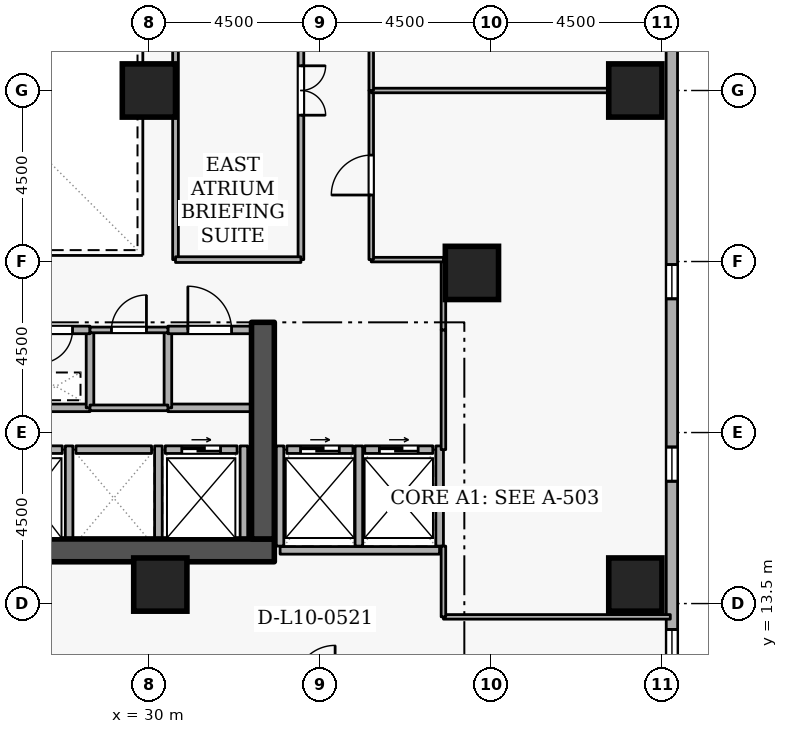
"""IFC4 building model, lengths in metres.
Left out: names, types, materials, properties, quantities, classifications, styles, units other than length and angle.
Written with IfcOpenShell. Run it as: python <this file> out.ifc"""

import sys

from ifc_helpers import new_model, si_unit, direction, frame, frame_2d, origin, origin_2d, place, context, subcontext, project, spatial, rectangle, extrude, element, fill, save


model = new_model("IFC4")
c1 = context("Model", 3, precision=1e-05, world=origin(), true_north=direction((0.0, 1.0)))
c2 = subcontext(c1, "Body", "Model", "MODEL_VIEW")
j1 = project(units=[si_unit("LENGTHUNIT", "METRE"), si_unit("PLANEANGLEUNIT", "RADIAN")], contexts=[c1])
p1 = place(None, origin())
s1 = spatial("IfcSite", under=j1, at=p1, CompositionType="ELEMENT")
p2 = place(p1, origin())
s2 = spatial("IfcBuilding", under=s1, at=p2, CompositionType="ELEMENT")
p3 = place(p2, frame((0.0, 0.0, 42.3)))
s3 = spatial("IfcBuildingStorey", under=s2, at=p3, CompositionType="ELEMENT", Elevation=42.3)
p4 = place(p3, frame((17.7, 14.9, 0.0), z_axis=(0.0, 0.0, 1.0), x_axis=(1.0, 0.0, 0.0)))
e1 = element("IfcWall", 1, at=p4, inside=s3, PredefinedType="SHEAR", context=c2, shape_type="SweptSolid", body=[
    extrude(rectangle(XDim=15.6, YDim=0.6, at=frame_2d((7.8, 0.0))), origin(), (0.0, 0.0, 1.0), 3.6),
])
p5 = place(p3, frame((33.0, 15.2, 0.0), z_axis=(0.0, 0.0, 1.0), x_axis=(0.0, 1.0, 0.0)))
e2 = element("IfcWall", 2, at=p5, inside=s3, PredefinedType="SHEAR", context=c2, shape_type="SweptSolid", body=[
    extrude(rectangle(XDim=5.7, YDim=0.6, at=frame_2d((2.85, 0.0))), origin(), (0.0, 0.0, 1.0), 3.6),
])
for number, where, z_axis, x_axis in (
    (3, (42.8, 14.0, 0.0), (0.0, 0.0, 1.0), (1.0, 0.0, 0.0)),
    (4, (42.8, 27.0, 0.0), (0.0, 0.0, 1.0), (1.0, 0.0, 0.0)),
    (5, (38.5, 22.2, 0.0), (0.0, 0.0, 1.0), (1.0, 0.0, 0.0)),
    (6, (30.3, 14.0, 0.0), (0.0, 0.0, 1.0), (1.0, 0.0, 0.0)),
    (7, (30.0, 27.0, 0.0), (0.0, 0.0, 1.0), (1.0, 0.0, 0.0)),
):
    element("IfcColumn", number, at=place(p3, frame(where, z_axis=z_axis, x_axis=x_axis)), inside=s3, PredefinedType="COLUMN", context=c2, shape_type="SweptSolid", body=[
        extrude(rectangle(XDim=1.4, YDim=1.4, at=origin_2d()), origin(), (0.0, 0.0, 1.0), 3.6),
    ])
p6 = place(p3, frame((43.765, 5.319, 0.0), z_axis=(0.0, 0.0, 1.0), x_axis=(-0.000208784245, 0.999999978205, 0.0)))
e8 = element("IfcWall", 8, at=p6, inside=s3, PredefinedType="STANDARD", context=c2, shape_type="SweptSolid", body=[
    extrude(rectangle(XDim=35.08, YDim=0.3, at=frame_2d((17.54, 0.0))), origin(), (0.0, 0.0, 1.0), 2.7),
])
p7 = place(p6, frame((1.8, 0.0, 0.72)))
e9 = element("IfcOpeningElement", 9, at=p7, cuts=e8, PredefinedType="OPENING", context=c2, shape_type="SweptSolid", body=[
    extrude(rectangle(XDim=0.9, YDim=1.75, at=frame_2d((0.45, 0.875))), frame((0.0, 0.16, 0.0), z_axis=(0.0, -1.0, 0.0), x_axis=(1.0, 0.0, 0.0)), (0.0, 0.0, 1.0), 0.32),
])
p8 = place(p6, frame((6.6, 0.0, 0.72)))
e10 = element("IfcOpeningElement", 10, at=p8, cuts=e8, PredefinedType="OPENING", context=c2, shape_type="SweptSolid", body=[
    extrude(rectangle(XDim=0.9, YDim=1.75, at=frame_2d((0.45, 0.875))), frame((0.0, 0.16, 0.0), z_axis=(0.0, -1.0, 0.0), x_axis=(1.0, 0.0, 0.0)), (0.0, 0.0, 1.0), 0.32),
])
p9 = place(p6, frame((11.4, 0.0, 0.72)))
e11 = element("IfcOpeningElement", 11, at=p9, cuts=e8, PredefinedType="OPENING", context=c2, shape_type="SweptSolid", body=[
    extrude(rectangle(XDim=0.9, YDim=1.75, at=frame_2d((0.45, 0.875))), frame((0.0, 0.16, 0.0), z_axis=(0.0, -1.0, 0.0), x_axis=(1.0, 0.0, 0.0)), (0.0, 0.0, 1.0), 0.32),
])
p10 = place(p6, frame((16.2, 0.0, 0.72)))
e12 = element("IfcOpeningElement", 12, at=p10, cuts=e8, PredefinedType="OPENING", context=c2, shape_type="SweptSolid", body=[
    extrude(rectangle(XDim=0.9, YDim=1.75, at=frame_2d((0.45, 0.875))), frame((0.0, 0.16, 0.0), z_axis=(0.0, -1.0, 0.0), x_axis=(1.0, 0.0, 0.0)), (0.0, 0.0, 1.0), 0.32),
])
p11 = place(p6, frame((25.8, 0.0, 0.72)))
e13 = element("IfcOpeningElement", 13, at=p11, cuts=e8, PredefinedType="OPENING", context=c2, shape_type="SweptSolid", body=[
    extrude(rectangle(XDim=0.9, YDim=1.75, at=frame_2d((0.45, 0.875))), frame((0.0, 0.16, 0.0), z_axis=(0.0, -1.0, 0.0), x_axis=(1.0, 0.0, 0.0)), (0.0, 0.0, 1.0), 0.32),
])
p12 = place(p6, frame((30.6, 0.0, 0.72)))
e14 = element("IfcOpeningElement", 14, at=p12, cuts=e8, PredefinedType="OPENING", context=c2, shape_type="SweptSolid", body=[
    extrude(rectangle(XDim=0.9, YDim=1.75, at=frame_2d((0.45, 0.875))), frame((0.0, 0.16, 0.0), z_axis=(0.0, -1.0, 0.0), x_axis=(1.0, 0.0, 0.0)), (0.0, 0.0, 1.0), 0.32),
])
p13 = place(p3, frame((26.08, 17.55, 0.0), z_axis=(0.0, 0.0, 1.0), x_axis=(1.0, 0.0, 0.0)))
e15 = element("IfcWall", 15, at=p13, inside=s3, PredefinedType="STANDARD", context=c2, shape_type="SweptSolid", body=[
    extrude(rectangle(XDim=1.64, YDim=0.2, at=frame_2d((0.82, 0.0))), origin(), (0.0, 0.0, 1.0), 3.34),
])
p14 = place(p13, frame((0.31, 0.0, 0.0)))
e16 = element("IfcOpeningElement", 16, at=p14, cuts=e15, PredefinedType="OPENING", context=c2, shape_type="SweptSolid", body=[
    extrude(rectangle(XDim=1.02, YDim=2.06, at=frame_2d((0.51, 1.03))), frame((0.0, 0.11, 0.0), z_axis=(0.0, -1.0, 0.0), x_axis=(1.0, 0.0, 0.0)), (0.0, 0.0, 1.0), 0.22),
])
p15 = place(p3, frame((28.08, 17.55, 0.0), z_axis=(0.0, 0.0, 1.0), x_axis=(1.0, 0.0, 0.0)))
e17 = element("IfcWall", 17, at=p15, inside=s3, PredefinedType="STANDARD", context=c2, shape_type="SweptSolid", body=[
    extrude(rectangle(XDim=1.99, YDim=0.2, at=frame_2d((0.995, 0.0))), origin(), (0.0, 0.0, 1.0), 3.34),
])
p16 = place(p3, frame((30.43, 17.55, 0.0), z_axis=(0.0, 0.0, 1.0), x_axis=(1.0, 0.0, 0.0)))
e18 = element("IfcWall", 18, at=p16, inside=s3, PredefinedType="STANDARD", context=c2, shape_type="SweptSolid", body=[
    extrude(rectangle(XDim=1.89, YDim=0.2, at=frame_2d((0.945, 0.0))), origin(), (0.0, 0.0, 1.0), 3.34),
])
p17 = place(p16, frame((0.435, 0.0, 0.0)))
e19 = element("IfcOpeningElement", 19, at=p17, cuts=e18, PredefinedType="OPENING", context=c2, shape_type="SweptSolid", body=[
    extrude(rectangle(XDim=1.02, YDim=2.06, at=frame_2d((0.51, 1.03))), frame((0.0, 0.11, 0.0), z_axis=(0.0, -1.0, 0.0), x_axis=(1.0, 0.0, 0.0)), (0.0, 0.0, 1.0), 0.22),
])
p18 = place(p3, frame((33.63, 17.55, 0.0), z_axis=(0.0, 0.0, 1.0), x_axis=(1.0, 0.0, 0.0)))
e20 = element("IfcWall", 20, at=p18, inside=s3, PredefinedType="STANDARD", context=c2, shape_type="SweptSolid", body=[
    extrude(rectangle(XDim=1.74, YDim=0.2, at=frame_2d((0.87, 0.0))), origin(), (0.0, 0.0, 1.0), 3.34),
])
p19 = place(p18, frame((0.36, 0.0, 0.0)))
e21 = element("IfcOpeningElement", 21, at=p19, cuts=e20, PredefinedType="OPENING", context=c2, shape_type="SweptSolid", body=[
    extrude(rectangle(XDim=1.02, YDim=2.06, at=frame_2d((0.51, 1.03))), frame((0.0, 0.11, 0.0), z_axis=(0.0, -1.0, 0.0), x_axis=(1.0, 0.0, 0.0)), (0.0, 0.0, 1.0), 0.22),
])
p20 = place(p3, frame((35.68, 17.55, 0.0), z_axis=(0.0, 0.0, 1.0), x_axis=(1.0, 0.0, 0.0)))
e22 = element("IfcWall", 22, at=p20, inside=s3, PredefinedType="STANDARD", context=c2, shape_type="SweptSolid", body=[
    extrude(rectangle(XDim=1.79, YDim=0.2, at=frame_2d((0.895, 0.0))), origin(), (0.0, 0.0, 1.0), 3.34),
])
p21 = place(p20, frame((0.385, 0.0, 0.0)))
e23 = element("IfcOpeningElement", 23, at=p21, cuts=e22, PredefinedType="OPENING", context=c2, shape_type="SweptSolid", body=[
    extrude(rectangle(XDim=1.02, YDim=2.06, at=frame_2d((0.51, 1.03))), frame((0.0, 0.11, 0.0), z_axis=(0.0, -1.0, 0.0), x_axis=(1.0, 0.0, 0.0)), (0.0, 0.0, 1.0), 0.22),
])
for number, where, z_axis, x_axis in (
    (24, (27.9, 15.212, 0.0), (0.0, 0.0, 1.0), (0.0, 1.0, 0.0)),
    (25, (30.25, 15.212, 0.0), (0.0, 0.0, 1.0), (0.0, 1.0, 0.0)),
    (26, (32.5, 15.212, 0.0), (0.0, 0.0, 1.0), (0.0, 1.0, 0.0)),
):
    element("IfcWall", number, at=place(p3, frame(where, z_axis=z_axis, x_axis=x_axis)), inside=s3, PredefinedType="STANDARD", context=c2, shape_type="SweptSolid", body=[
        extrude(rectangle(XDim=2.436, YDim=0.2, at=frame_2d((1.218, 0.0))), origin(), (0.0, 0.0, 1.0), 3.34),
    ])
p22 = place(p3, frame((33.452, 14.9, 0.0), z_axis=(0.0, 0.0, 1.0), x_axis=(1.0, 0.0, 0.0)))
e27 = element("IfcWall", 27, at=p22, inside=s3, PredefinedType="STANDARD", context=c2, shape_type="SweptSolid", body=[
    extrude(rectangle(XDim=4.196, YDim=0.2, at=frame_2d((2.098, 0.0))), origin(), (0.0, 0.0, 1.0), 3.34),
])
for number, where, z_axis, x_axis in (
    (28, (35.525, 15.012, 0.0), (0.0, 0.0, 1.0), (0.0, 1.0, 0.0)),
    (29, (33.45, 15.012, 0.0), (0.0, 0.0, 1.0), (0.0, 1.0, 0.0)),
    (30, (37.65, 15.012, 0.0), (0.0, 0.0, 1.0), (0.0, 1.0, 0.0)),
):
    element("IfcWall", number, at=place(p3, frame(where, z_axis=z_axis, x_axis=x_axis)), inside=s3, PredefinedType="STANDARD", context=c2, shape_type="SweptSolid", body=[
        extrude(rectangle(XDim=2.636, YDim=0.2, at=frame_2d((1.318, 0.0))), origin(), (0.0, 0.0, 1.0), 3.34),
    ])
p23 = place(p3, frame((26.65, 18.65, 0.0), z_axis=(0.0, 0.0, 1.0), x_axis=(1.0, 0.0, 0.0)))
e31 = element("IfcWall", 31, at=p23, inside=s3, PredefinedType="STANDARD", context=c2, shape_type="SweptSolid", body=[
    extrude(rectangle(XDim=1.8, YDim=0.2, at=frame_2d((0.9, 0.0))), origin(), (0.0, 0.0, 1.0), 3.34),
])
p24 = place(p3, frame((28.45, 18.65, 0.0), z_axis=(0.0, 0.0, 1.0), x_axis=(0.0, 1.0, 0.0)))
e32 = element("IfcWall", 32, at=p24, inside=s3, PredefinedType="STANDARD", context=c2, shape_type="SweptSolid", body=[
    extrude(rectangle(XDim=2.05, YDim=0.2, at=frame_2d((1.025, 0.0))), origin(), (0.0, 0.0, 1.0), 3.34),
])
p25 = place(p3, frame((28.45, 20.7, 0.0), z_axis=(0.0, 0.0, 1.0), x_axis=(-1.0, 0.0, 0.0)))
e33 = element("IfcWall", 33, at=p25, inside=s3, PredefinedType="STANDARD", context=c2, shape_type="SweptSolid", body=[
    extrude(rectangle(XDim=1.8, YDim=0.2, at=frame_2d((0.9, 0.0))), origin(), (0.0, 0.0, 1.0), 3.34),
])
p26 = place(p25, frame((0.46, 0.0, 0.0)))
e34 = element("IfcOpeningElement", 34, at=p26, cuts=e33, PredefinedType="OPENING", context=c2, shape_type="SweptSolid", body=[
    extrude(rectangle(XDim=0.88, YDim=2.04, at=frame_2d((0.44, 1.02))), frame((0.0, 0.11, 0.0), z_axis=(0.0, -1.0, 0.0), x_axis=(1.0, 0.0, 0.0)), (0.0, 0.0, 1.0), 0.22),
])
p27 = place(p3, frame((32.7, 18.65, 0.0), z_axis=(0.0, 0.0, 1.0), x_axis=(-1.0, 0.0, 0.0)))
e35 = element("IfcWall", 35, at=p27, inside=s3, PredefinedType="STANDARD", context=c2, shape_type="SweptSolid", body=[
    extrude(rectangle(XDim=2.2, YDim=0.2, at=frame_2d((1.1, 0.0))), origin(), (0.0, 0.0, 1.0), 3.34),
])
p28 = place(p3, frame((30.5, 18.65, 0.0), z_axis=(0.0, 0.0, 1.0), x_axis=(0.0, 1.0, 0.0)))
e36 = element("IfcWall", 36, at=p28, inside=s3, PredefinedType="STANDARD", context=c2, shape_type="SweptSolid", body=[
    extrude(rectangle(XDim=2.05, YDim=0.2, at=frame_2d((1.025, 0.0))), origin(), (0.0, 0.0, 1.0), 3.34),
])
p29 = place(p3, frame((30.5, 20.7, 0.0), z_axis=(0.0, 0.0, 1.0), x_axis=(1.0, 0.0, 0.0)))
e37 = element("IfcWall", 37, at=p29, inside=s3, PredefinedType="STANDARD", context=c2, shape_type="SweptSolid", body=[
    extrude(rectangle(XDim=2.2, YDim=0.2, at=frame_2d((1.1, 0.0))), origin(), (0.0, 0.0, 1.0), 3.34),
])
p30 = place(p29, frame((0.525, 0.0, 0.0)))
e38 = element("IfcOpeningElement", 38, at=p30, cuts=e37, PredefinedType="OPENING", context=c2, shape_type="SweptSolid", body=[
    extrude(rectangle(XDim=1.15, YDim=2.1, at=frame_2d((0.575, 1.05))), frame((0.0, 0.11, 0.0), z_axis=(0.0, -1.0, 0.0), x_axis=(1.0, 0.0, 0.0)), (0.0, 0.0, 1.0), 0.22),
])
p31 = place(p3, frame((30.5, 18.65, 0.0), z_axis=(0.0, 0.0, 1.0), x_axis=(-1.0, 0.0, 0.0)))
e39 = element("IfcWall", 39, at=p31, inside=s3, PredefinedType="PARTITIONING", context=c2, shape_type="SweptSolid", body=[
    extrude(rectangle(XDim=2.05, YDim=0.15, at=frame_2d((1.025, 0.0))), origin(), (0.0, 0.0, 1.0), 3.34),
])
p32 = place(p3, frame((28.45, 20.7, 0.0), z_axis=(0.0, 0.0, 1.0), x_axis=(1.0, 0.0, 0.0)))
e40 = element("IfcWall", 40, at=p32, inside=s3, PredefinedType="PARTITIONING", context=c2, shape_type="SweptSolid", body=[
    extrude(rectangle(XDim=2.05, YDim=0.15, at=frame_2d((1.025, 0.0))), origin(), (0.0, 0.0, 1.0), 3.34),
])
p33 = place(p32, frame((0.565, 0.0, 0.0)))
e41 = element("IfcOpeningElement", 41, at=p33, cuts=e40, PredefinedType="OPENING", context=c2, shape_type="SweptSolid", body=[
    extrude(rectangle(XDim=0.92, YDim=2.08, at=frame_2d((0.46, 1.04))), frame((0.0, 0.085, 0.0), z_axis=(0.0, -1.0, 0.0), x_axis=(1.0, 0.0, 0.0)), (0.0, 0.0, 1.0), 0.17),
])
p34 = place(p3, frame((37.75, 17.55, 0.0), z_axis=(0.0, 0.0, 1.0), x_axis=(0.0, 1.0, 0.0)))
e42 = element("IfcWall", 42, at=p34, inside=s3, PredefinedType="PARTITIONING", context=c2, shape_type="SweptSolid", body=[
    extrude(rectangle(XDim=3.15, YDim=0.12, at=frame_2d((1.575, 0.0))), origin(), (0.0, 0.0, 1.0), 3.34),
])
p35 = place(p3, frame((37.75, 20.7, 0.0), z_axis=(0.0, 0.0, 1.0), x_axis=(0.0, 1.0, 0.0)))
e43 = element("IfcWall", 43, at=p35, inside=s3, PredefinedType="PARTITIONING", context=c2, shape_type="SweptSolid", body=[
    extrude(rectangle(XDim=1.85, YDim=0.12, at=frame_2d((0.925, 0.0))), origin(), (0.0, 0.0, 1.0), 3.34),
])
p36 = place(p3, frame((37.75, 22.55, 0.0), z_axis=(0.0, 0.0, 1.0), x_axis=(-1.0, 0.0, 0.0)))
e44 = element("IfcWall", 44, at=p36, inside=s3, PredefinedType="PARTITIONING", context=c2, shape_type="SweptSolid", body=[
    extrude(rectangle(XDim=1.9, YDim=0.12, at=frame_2d((0.95, 0.0))), origin(), (0.0, 0.0, 1.0), 3.34),
])
p37 = place(p3, frame((35.85, 22.55, 0.0), z_axis=(0.0, 0.0, 1.0), x_axis=(0.0, 1.0, 0.0)))
e45 = element("IfcWall", 45, at=p37, inside=s3, PredefinedType="PARTITIONING", context=c2, shape_type="SweptSolid", body=[
    extrude(rectangle(XDim=4.45, YDim=0.12, at=frame_2d((2.225, 0.0))), origin(), (0.0, 0.0, 1.0), 3.34),
])
p38 = place(p37, frame((1.7, 0.0, 0.0)))
e46 = element("IfcOpeningElement", 46, at=p38, cuts=e45, PredefinedType="OPENING", context=c2, shape_type="SweptSolid", body=[
    extrude(rectangle(XDim=1.05, YDim=2.1, at=frame_2d((0.525, 1.05))), frame((0.0, 0.07, 0.0), z_axis=(0.0, -1.0, 0.0), x_axis=(1.0, 0.0, 0.0)), (0.0, 0.0, 1.0), 0.14),
])
p39 = place(p3, frame((35.85, 27.0, 0.0), z_axis=(0.0, 0.0, 1.0), x_axis=(1.0, 0.0, 0.0)))
e47 = element("IfcWall", 47, at=p39, inside=s3, PredefinedType="PARTITIONING", context=c2, shape_type="SweptSolid", body=[
    extrude(rectangle(XDim=6.95, YDim=0.12, at=frame_2d((3.475, 0.0))), origin(), (0.0, 0.0, 1.0), 2.882),
])
p40 = place(p3, frame((43.72, 13.15, 0.0), z_axis=(0.0, 0.0, 1.0), x_axis=(-1.0, 0.0, 0.0)))
e48 = element("IfcWall", 48, at=p40, inside=s3, PredefinedType="PARTITIONING", context=c2, shape_type="SweptSolid", body=[
    extrude(rectangle(XDim=5.97, YDim=0.12, at=frame_2d((2.985, 0.0))), origin(), (0.0, 0.0, 1.0), 3.34),
])
p41 = place(p3, frame((37.75, 13.15, 0.0), z_axis=(0.0, 0.0, 1.0), x_axis=(0.0, 1.0, 0.0)))
e49 = element("IfcWall", 49, at=p41, inside=s3, PredefinedType="PARTITIONING", context=c2, shape_type="SweptSolid", body=[
    extrude(rectangle(XDim=1.862, YDim=0.12, at=frame_2d((0.931, 0.0))), origin(), (0.0, 0.0, 1.0), 3.34),
])
p42 = place(p3, frame((35.85, 27.0, 0.0), z_axis=(0.0, 0.0, 1.0), x_axis=(0.0, 1.0, 0.0)))
e50 = element("IfcWall", 50, at=p42, inside=s3, PredefinedType="PARTITIONING", context=c2, shape_type="SweptSolid", body=[
    extrude(rectangle(XDim=3.15, YDim=0.12, at=frame_2d((1.575, 0.0))), origin(), (0.0, 0.0, 1.0), 3.34),
])
p43 = place(p42, frame((1.1, 0.0, 0.0)))
e51 = element("IfcOpeningElement", 51, at=p43, cuts=e50, PredefinedType="OPENING", context=c2, shape_type="SweptSolid", body=[
    extrude(rectangle(XDim=0.95, YDim=2.1, at=frame_2d((0.475, 1.05))), frame((0.0, 0.07, 0.0), z_axis=(0.0, -1.0, 0.0), x_axis=(1.0, 0.0, 0.0)), (0.0, 0.0, 1.0), 0.14),
])
p44 = place(p3, frame((30.7, 22.55, 0.0), z_axis=(0.0, 0.0, 1.0), x_axis=(0.0, 1.0, 0.0)))
e52 = element("IfcWall", 52, at=p44, inside=s3, PredefinedType="PARTITIONING", context=c2, shape_type="SweptSolid", body=[
    extrude(rectangle(XDim=8.9, YDim=0.15, at=frame_2d((4.45, 0.0))), origin(), (0.0, 0.0, 1.0), 3.34),
])
p45 = place(p3, frame((34.0, 31.45, 0.0), z_axis=(0.0, 0.0, 1.0), x_axis=(0.0, -1.0, 0.0)))
e53 = element("IfcWall", 53, at=p45, inside=s3, PredefinedType="PARTITIONING", context=c2, shape_type="SweptSolid", body=[
    extrude(rectangle(XDim=8.9, YDim=0.15, at=frame_2d((4.45, 0.0))), origin(), (0.0, 0.0, 1.0), 3.34),
])
p46 = place(p45, frame((3.8, 0.0, 0.0)))
e54 = element("IfcOpeningElement", 54, at=p46, cuts=e53, PredefinedType="OPENING", context=c2, shape_type="SweptSolid", body=[
    extrude(rectangle(XDim=1.3, YDim=2.12, at=frame_2d((0.65, 1.06))), frame((0.0, 0.085, 0.0), z_axis=(0.0, -1.0, 0.0), x_axis=(1.0, 0.0, 0.0)), (0.0, 0.0, 1.0), 0.17),
])
p47 = place(p3, frame((34.0, 22.55, 0.0), z_axis=(0.0, 0.0, 1.0), x_axis=(-1.0, 0.0, 0.0)))
e55 = element("IfcWall", 55, at=p47, inside=s3, PredefinedType="PARTITIONING", context=c2, shape_type="SweptSolid", body=[
    extrude(rectangle(XDim=3.3, YDim=0.15, at=frame_2d((1.65, 0.0))), origin(), (0.0, 0.0, 1.0), 3.34),
])
p48 = place(p8, origin())
e56 = element("IfcWindow", 56, at=p48, inside=s3, PartitioningType="SINGLE_PANEL", PredefinedType="WINDOW", context=c2, shape_type="SweptSolid", body=[
    extrude(rectangle(XDim=0.9, YDim=1.75, at=frame_2d((0.45, 0.875))), frame((0.0, 0.03, 0.0), z_axis=(0.0, -1.0, 0.0), x_axis=(1.0, 0.0, 0.0)), (0.0, 0.0, 1.0), 0.06),
])
fill(e10, e56)
p49 = place(p9, origin())
e57 = element("IfcWindow", 57, at=p49, inside=s3, PartitioningType="SINGLE_PANEL", PredefinedType="WINDOW", context=c2, shape_type="SweptSolid", body=[
    extrude(rectangle(XDim=0.9, YDim=1.75, at=frame_2d((0.45, 0.875))), frame((0.0, 0.03, 0.0), z_axis=(0.0, -1.0, 0.0), x_axis=(1.0, 0.0, 0.0)), (0.0, 0.0, 1.0), 0.06),
])
fill(e11, e57)
p50 = place(p10, origin())
e58 = element("IfcWindow", 58, at=p50, inside=s3, PartitioningType="SINGLE_PANEL", PredefinedType="WINDOW", context=c2, shape_type="SweptSolid", body=[
    extrude(rectangle(XDim=0.9, YDim=1.75, at=frame_2d((0.45, 0.875))), frame((0.0, 0.03, 0.0), z_axis=(0.0, -1.0, 0.0), x_axis=(1.0, 0.0, 0.0)), (0.0, 0.0, 1.0), 0.06),
])
fill(e12, e58)
p51 = place(p17, origin())
e59 = element("IfcDoor", 59, at=p51, inside=s3, OperationType="SLIDING_TO_LEFT", PredefinedType="DOOR", context=c2, shape_type="SweptSolid", body=[
    extrude(rectangle(XDim=1.02, YDim=2.06, at=frame_2d((0.51, 1.03))), frame((0.0, 0.025, 0.0), z_axis=(0.0, -1.0, 0.0), x_axis=(1.0, 0.0, 0.0)), (0.0, 0.0, 1.0), 0.05),
])
fill(e19, e59)
p52 = place(p19, origin())
e60 = element("IfcDoor", 60, at=p52, inside=s3, OperationType="SLIDING_TO_LEFT", PredefinedType="DOOR", context=c2, shape_type="SweptSolid", body=[
    extrude(rectangle(XDim=1.02, YDim=2.06, at=frame_2d((0.51, 1.03))), frame((0.0, 0.025, 0.0), z_axis=(0.0, -1.0, 0.0), x_axis=(1.0, 0.0, 0.0)), (0.0, 0.0, 1.0), 0.05),
])
fill(e21, e60)
p53 = place(p21, origin())
e61 = element("IfcDoor", 61, at=p53, inside=s3, OperationType="SLIDING_TO_LEFT", PredefinedType="DOOR", context=c2, shape_type="SweptSolid", body=[
    extrude(rectangle(XDim=1.02, YDim=2.06, at=frame_2d((0.51, 1.03))), frame((0.0, 0.025, 0.0), z_axis=(0.0, -1.0, 0.0), x_axis=(1.0, 0.0, 0.0)), (0.0, 0.0, 1.0), 0.05),
])
fill(e23, e61)
p54 = place(p26, origin())
e62 = element("IfcDoor", 62, at=p54, inside=s3, OperationType="SINGLE_SWING_RIGHT", PredefinedType="DOOR", context=c2, shape_type="SweptSolid", body=[
    extrude(rectangle(XDim=0.88, YDim=2.04, at=frame_2d((0.44, 1.02))), frame((0.0, 0.025, 0.0), z_axis=(0.0, -1.0, 0.0), x_axis=(1.0, 0.0, 0.0)), (0.0, 0.0, 1.0), 0.05),
])
fill(e34, e62)
p55 = place(p33, origin())
e63 = element("IfcDoor", 63, at=p55, inside=s3, OperationType="SINGLE_SWING_RIGHT", PredefinedType="DOOR", context=c2, shape_type="SweptSolid", body=[
    extrude(rectangle(XDim=0.92, YDim=2.08, at=frame_2d((0.46, 1.04))), frame((0.0, 0.025, 0.0), z_axis=(0.0, -1.0, 0.0), x_axis=(1.0, 0.0, 0.0)), (0.0, 0.0, 1.0), 0.05),
])
fill(e41, e63)
p56 = place(p30, origin())
e64 = element("IfcDoor", 64, at=p56, inside=s3, OperationType="SINGLE_SWING_LEFT", PredefinedType="DOOR", context=c2, shape_type="SweptSolid", body=[
    extrude(rectangle(XDim=1.15, YDim=2.1, at=frame_2d((0.575, 1.05))), frame((0.0, 0.025, 0.0), z_axis=(0.0, -1.0, 0.0), x_axis=(1.0, 0.0, 0.0)), (0.0, 0.0, 1.0), 0.05),
])
fill(e38, e64)
p57 = place(p38, origin())
e65 = element("IfcDoor", 65, at=p57, inside=s3, OperationType="SINGLE_SWING_LEFT", PredefinedType="DOOR", context=c2, shape_type="SweptSolid", body=[
    extrude(rectangle(XDim=1.05, YDim=2.1, at=frame_2d((0.525, 1.05))), frame((0.0, 0.025, 0.0), z_axis=(0.0, -1.0, 0.0), x_axis=(1.0, 0.0, 0.0)), (0.0, 0.0, 1.0), 0.05),
])
fill(e46, e65)
p58 = place(p46, origin())
e66 = element("IfcDoor", 66, at=p58, inside=s3, OperationType="DOUBLE_DOOR_SINGLE_SWING", PredefinedType="DOOR", context=c2, shape_type="SweptSolid", body=[
    extrude(rectangle(XDim=1.3, YDim=2.12, at=frame_2d((0.65, 1.06))), frame((0.0, 0.025, 0.0), z_axis=(0.0, -1.0, 0.0), x_axis=(1.0, 0.0, 0.0)), (0.0, 0.0, 1.0), 0.05),
])
fill(e54, e66)
save(model, sys.argv[1])
